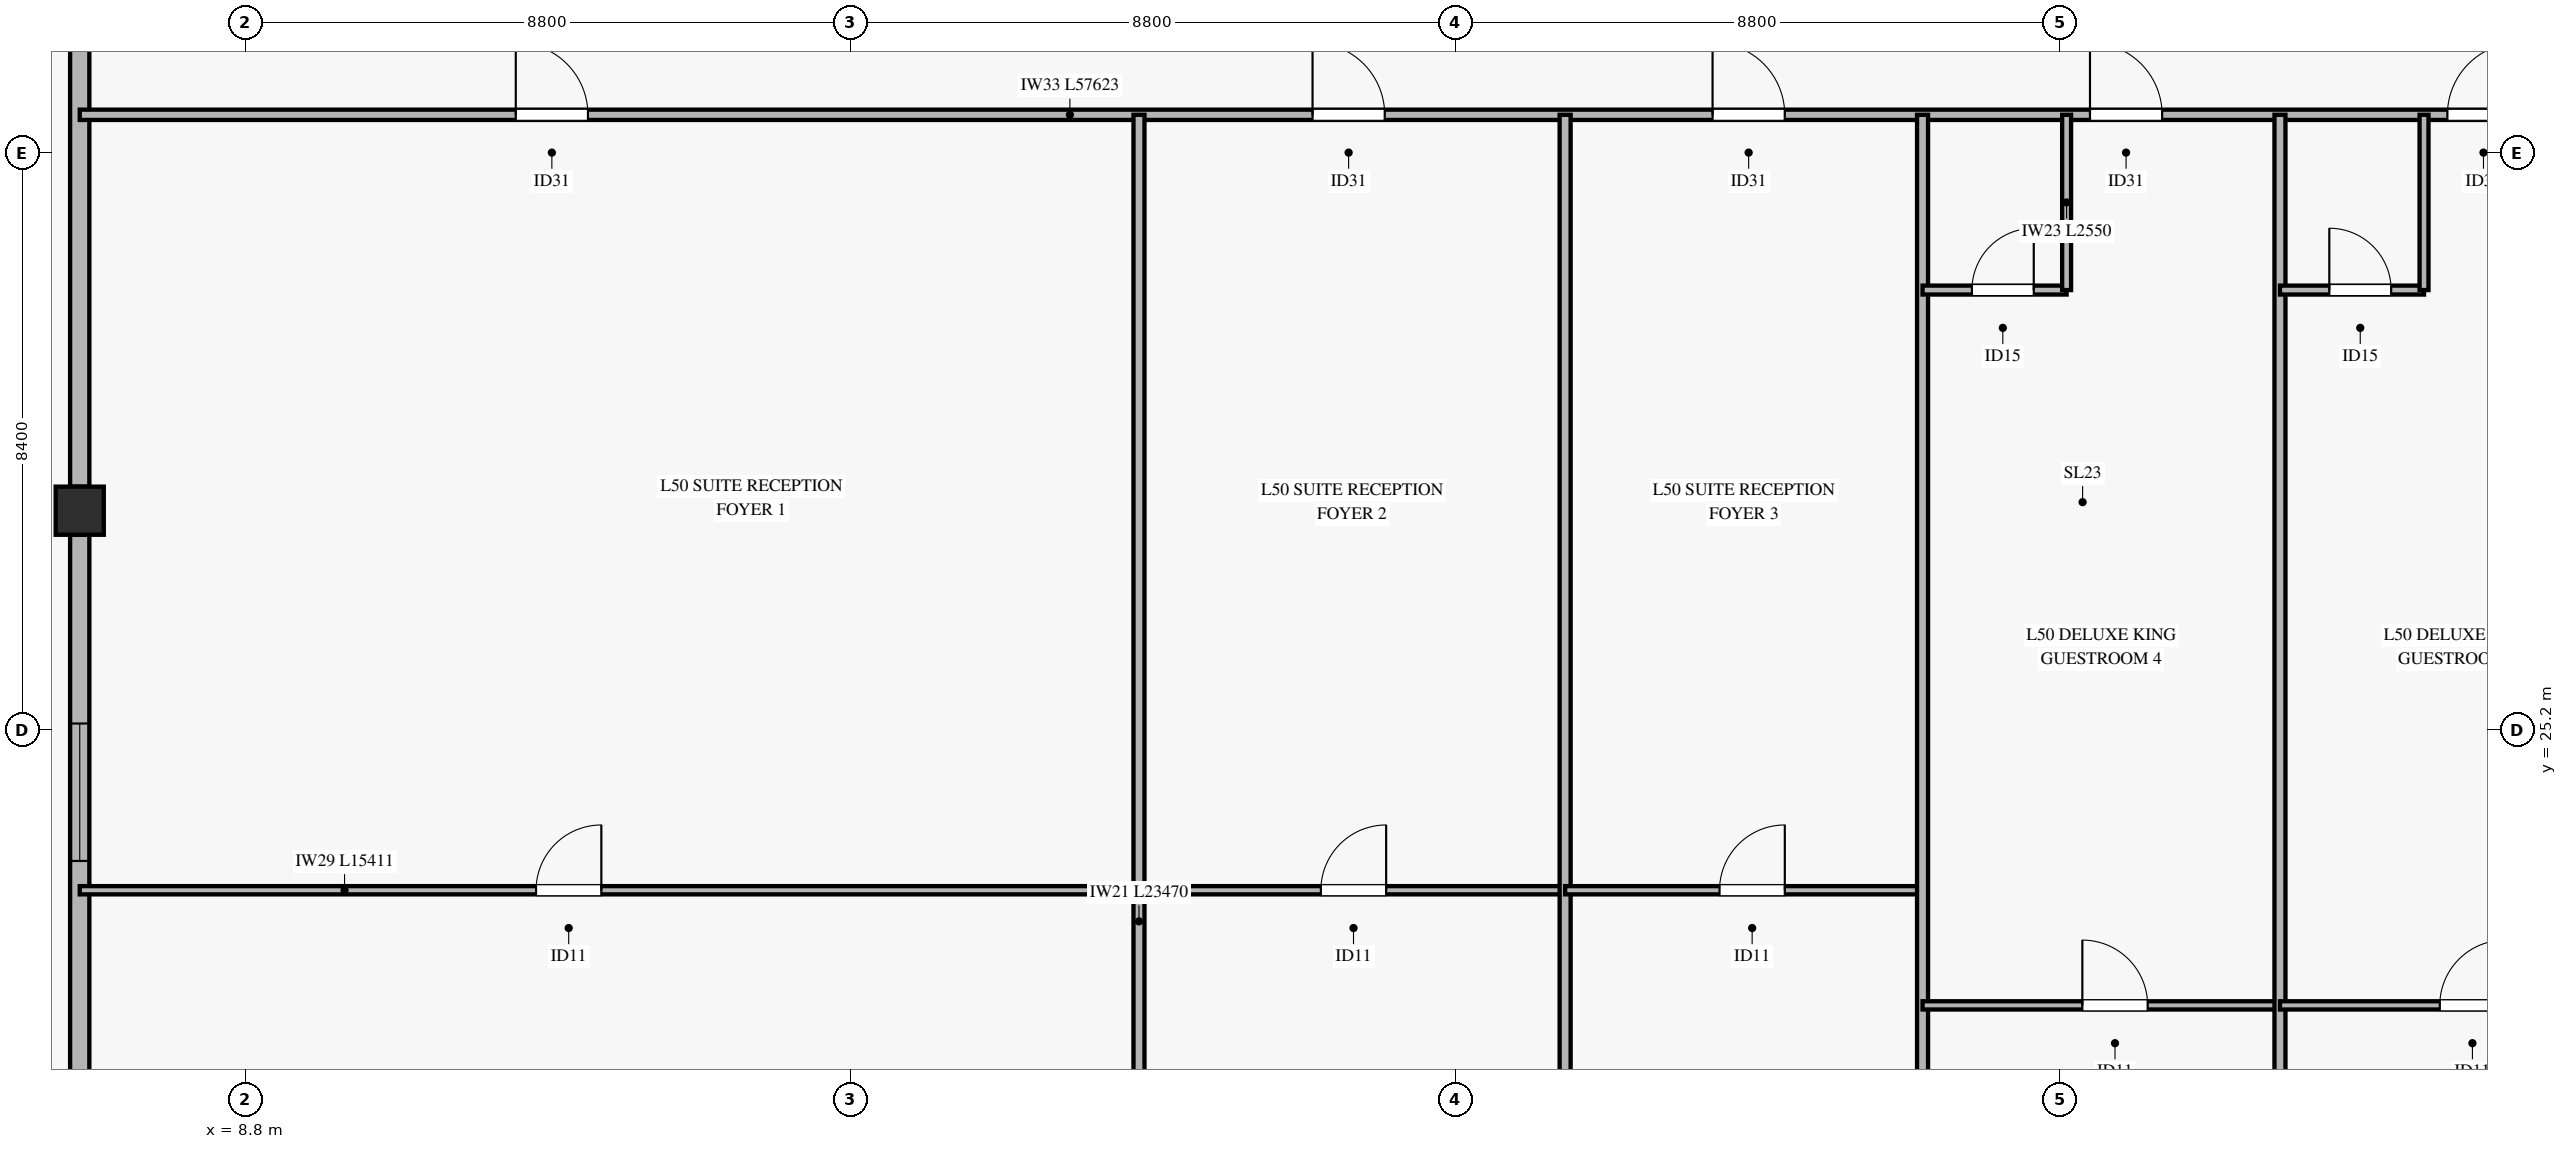
"""IFC4 building model, lengths in metres.
Left out: names, types, materials, properties, quantities, classifications, styles, units other than length and angle.
Written with IfcOpenShell. Run it as: python <this file> out.ifc"""

import sys

from ifc_helpers import new_model, si_unit, direction, frame, frame_2d, origin, origin_2d, place, context, subcontext, project, spatial, rectangle, hollow_rectangle, extrude, source, transform, mapped, element, fill, save


model = new_model("IFC4")
c1 = context("Model", 3, precision=1e-05, world=origin(), true_north=direction((0.0, 1.0)))
c2 = subcontext(c1, "Body", "Model", "MODEL_VIEW")
j1 = project(units=[si_unit("LENGTHUNIT", "METRE"), si_unit("PLANEANGLEUNIT", "RADIAN")], contexts=[c1])
p1 = place(None, origin())
s1 = spatial("IfcSite", under=j1, at=p1, CompositionType="ELEMENT")
p2 = place(p1, origin())
s2 = spatial("IfcBuilding", under=s1, at=p2, CompositionType="ELEMENT")
p3 = place(p2, frame((0.0, 0.0, 199.2)))
s3 = spatial("IfcBuildingStorey", under=s2, at=p3, CompositionType="ELEMENT", Elevation=199.2)
m1 = source(origin(), c2, "Body", "SweptSolid", [
    extrude(hollow_rectangle(XDim=0.7, YDim=0.7, WallThickness=0.032, at=origin_2d()), origin(), (0.0, 0.0, 1.0), 3.304),
])
p4 = place(p3, frame((6.389, 28.39, 0.0), z_axis=(0.095026488821, 0.106849380121, 0.989723787928), x_axis=(-0.747238227779, 0.664556266199, 0.0)))
e1 = element("IfcColumn", 1, at=p4, inside=s3, PredefinedType="COLUMN", context=c2, shape_type="MappedRepresentation", body=[
    mapped(m1, transform((0.0, 0.0, 0.0), x_axis=(1.0, 0.0, 0.0), y_axis=(0.0, 1.0, 0.0), z_axis=(0.0, 0.0, 1.0), scale=1.0)),
])
p5 = place(p3, frame((6.389, 13.515, 0.0), z_axis=(0.0, 0.0, 1.0), x_axis=(0.0, 1.0, 0.0)))
e2 = element("IfcWall", 2, at=p5, inside=s3, PredefinedType="SOLIDWALL", context=c2, shape_type="SweptSolid", body=[
    extrude(rectangle(XDim=14.525, YDim=0.28, at=frame_2d((7.263, 0.0))), origin(), (0.0, 0.0, 1.0), 2.75),
])
p6 = place(p5, frame((3.017, 0.0, 0.45)))
e3 = element("IfcOpeningElement", 3, at=p6, cuts=e2, PredefinedType="OPENING", context=c2, shape_type="SweptSolid", body=[
    extrude(rectangle(XDim=2.0, YDim=2.0, at=frame_2d((1.0, 1.0))), frame((0.0, 0.15, 0.0), z_axis=(0.0, -1.0, 0.0), x_axis=(1.0, 0.0, 0.0)), (0.0, 0.0, 1.0), 0.3),
])
p7 = place(p5, frame((9.779, 0.0, 0.45)))
e4 = element("IfcOpeningElement", 4, at=p7, cuts=e2, PredefinedType="OPENING", context=c2, shape_type="SweptSolid", body=[
    extrude(rectangle(XDim=2.0, YDim=2.0, at=frame_2d((1.0, 1.0))), frame((0.0, 0.15, 0.0), z_axis=(0.0, -1.0, 0.0), x_axis=(1.0, 0.0, 0.0)), (0.0, 0.0, 1.0), 0.3),
])
p8 = place(p3, frame((6.389, 28.74, 0.0), z_axis=(0.0, 0.0, 1.0), x_axis=(0.0, 1.0, 0.0)))
e5 = element("IfcWall", 5, at=p8, inside=s3, PredefinedType="SOLIDWALL", context=c2, shape_type="SweptSolid", body=[
    extrude(rectangle(XDim=14.525, YDim=0.28, at=frame_2d((7.262, 0.0))), origin(), (0.0, 0.0, 1.0), 2.75),
])
p9 = place(p8, frame((9.115, 0.0, 0.45)))
e6 = element("IfcOpeningElement", 6, at=p9, cuts=e5, PredefinedType="OPENING", context=c2, shape_type="SweptSolid", body=[
    extrude(rectangle(XDim=2.0, YDim=2.0, at=frame_2d((1.0, 1.0))), frame((0.0, 0.15, 0.0), z_axis=(0.0, -1.0, 0.0), x_axis=(1.0, 0.0, 0.0)), (0.0, 0.0, 1.0), 0.3),
])
p10 = place(p3, frame((6.389, 34.15, 0.0), z_axis=(0.0, 0.0, 1.0), x_axis=(1.0, 0.0, 0.0)))
e7 = element("IfcWall", 7, at=p10, inside=s3, PredefinedType="PARTITIONING", context=c2, shape_type="SweptSolid", body=[
    extrude(rectangle(XDim=57.623, YDim=0.15, at=frame_2d((28.812, 0.0))), origin(), (0.0, 0.0, 1.0), 2.455),
])
p11 = place(p10, frame((6.344, 0.0, 0.0)))
e8 = element("IfcOpeningElement", 8, at=p11, cuts=e7, PredefinedType="OPENING", context=c2, shape_type="SweptSolid", body=[
    extrude(rectangle(XDim=1.05, YDim=2.15, at=frame_2d((0.525, 1.075))), frame((0.0, 0.085, 0.0), z_axis=(0.0, -1.0, 0.0), x_axis=(1.0, 0.0, 0.0)), (0.0, 0.0, 1.0), 0.17),
])
p12 = place(p10, frame((17.936, 0.0, 0.0)))
e9 = element("IfcOpeningElement", 9, at=p12, cuts=e7, PredefinedType="OPENING", context=c2, shape_type="SweptSolid", body=[
    extrude(rectangle(XDim=1.05, YDim=2.15, at=frame_2d((0.525, 1.075))), frame((0.0, 0.085, 0.0), z_axis=(0.0, -1.0, 0.0), x_axis=(1.0, 0.0, 0.0)), (0.0, 0.0, 1.0), 0.17),
])
p13 = place(p10, frame((23.756, 0.0, 0.0)))
e10 = element("IfcOpeningElement", 10, at=p13, cuts=e7, PredefinedType="OPENING", context=c2, shape_type="SweptSolid", body=[
    extrude(rectangle(XDim=1.05, YDim=2.15, at=frame_2d((0.525, 1.075))), frame((0.0, 0.085, 0.0), z_axis=(0.0, -1.0, 0.0), x_axis=(1.0, 0.0, 0.0)), (0.0, 0.0, 1.0), 0.17),
])
p14 = place(p10, frame((29.247, 0.0, 0.0)))
e11 = element("IfcOpeningElement", 11, at=p14, cuts=e7, PredefinedType="OPENING", context=c2, shape_type="SweptSolid", body=[
    extrude(rectangle(XDim=1.05, YDim=2.15, at=frame_2d((0.525, 1.075))), frame((0.0, 0.085, 0.0), z_axis=(0.0, -1.0, 0.0), x_axis=(1.0, 0.0, 0.0)), (0.0, 0.0, 1.0), 0.17),
])
p15 = place(p10, frame((34.447, 0.0, 0.0)))
e12 = element("IfcOpeningElement", 12, at=p15, cuts=e7, PredefinedType="OPENING", context=c2, shape_type="SweptSolid", body=[
    extrude(rectangle(XDim=1.05, YDim=2.15, at=frame_2d((0.525, 1.075))), frame((0.0, 0.085, 0.0), z_axis=(0.0, -1.0, 0.0), x_axis=(1.0, 0.0, 0.0)), (0.0, 0.0, 1.0), 0.17),
])
p16 = place(p10, frame((44.941, 0.0, 0.0)))
e13 = element("IfcOpeningElement", 13, at=p16, cuts=e7, PredefinedType="OPENING", context=c2, shape_type="SweptSolid", body=[
    extrude(rectangle(XDim=1.05, YDim=2.15, at=frame_2d((0.525, 1.075))), frame((0.0, 0.085, 0.0), z_axis=(0.0, -1.0, 0.0), x_axis=(1.0, 0.0, 0.0)), (0.0, 0.0, 1.0), 0.17),
])
p17 = place(p3, frame((6.389, 22.868, 0.0), z_axis=(0.0, 0.0, 1.0), x_axis=(1.0, 0.0, 0.0)))
e14 = element("IfcWall", 14, at=p17, inside=s3, PredefinedType="PARTITIONING", context=c2, shape_type="SweptSolid", body=[
    extrude(rectangle(XDim=15.411, YDim=0.12, at=frame_2d((7.706, 0.0))), origin(), (0.0, 0.0, 1.0), 2.455),
])
p18 = place(p17, frame((6.639, 0.0, 0.0)))
e15 = element("IfcOpeningElement", 15, at=p18, cuts=e14, PredefinedType="OPENING", context=c2, shape_type="SweptSolid", body=[
    extrude(rectangle(XDim=0.95, YDim=2.1, at=frame_2d((0.475, 1.05))), frame((0.0, 0.07, 0.0), z_axis=(0.0, -1.0, 0.0), x_axis=(1.0, 0.0, 0.0)), (0.0, 0.0, 1.0), 0.14),
])
p19 = place(p3, frame((21.8, 10.68, 0.0), z_axis=(0.0, 0.0, 1.0), x_axis=(0.0, 1.0, 0.0)))
e16 = element("IfcWall", 16, at=p19, inside=s3, PredefinedType="PARTITIONING", context=c2, shape_type="SweptSolid", body=[
    extrude(rectangle(XDim=23.47, YDim=0.16, at=frame_2d((11.735, 0.0))), origin(), (0.0, 0.0, 1.0), 2.755),
])
p20 = place(p3, frame((21.8, 22.868, 0.0), z_axis=(0.0, 0.0, 1.0), x_axis=(1.0, 0.0, 0.0)))
e17 = element("IfcWall", 17, at=p20, inside=s3, PredefinedType="PARTITIONING", context=c2, shape_type="SweptSolid", body=[
    extrude(rectangle(XDim=6.2, YDim=0.12, at=frame_2d((3.1, 0.0))), origin(), (0.0, 0.0, 1.0), 3.27),
])
p21 = place(p20, frame((2.646, 0.0, 0.0)))
e18 = element("IfcOpeningElement", 18, at=p21, cuts=e17, PredefinedType="OPENING", context=c2, shape_type="SweptSolid", body=[
    extrude(rectangle(XDim=0.95, YDim=2.1, at=frame_2d((0.475, 1.05))), frame((0.0, 0.07, 0.0), z_axis=(0.0, -1.0, 0.0), x_axis=(1.0, 0.0, 0.0)), (0.0, 0.0, 1.0), 0.14),
])
p22 = place(p3, frame((28.0, 10.68, 0.0), z_axis=(0.0, 0.0, 1.0), x_axis=(0.0, 1.0, 0.0)))
e19 = element("IfcWall", 19, at=p22, inside=s3, PredefinedType="PARTITIONING", context=c2, shape_type="SweptSolid", body=[
    extrude(rectangle(XDim=23.47, YDim=0.16, at=frame_2d((11.735, 0.0))), origin(), (0.0, 0.0, 1.0), 2.755),
])
p23 = place(p3, frame((28.0, 22.868, 0.0), z_axis=(0.0, 0.0, 1.0), x_axis=(1.0, 0.0, 0.0)))
e20 = element("IfcWall", 20, at=p23, inside=s3, PredefinedType="PARTITIONING", context=c2, shape_type="SweptSolid", body=[
    extrude(rectangle(XDim=5.2, YDim=0.12, at=frame_2d((2.6, 0.0))), origin(), (0.0, 0.0, 1.0), 2.455),
])
p24 = place(p23, frame((2.246, 0.0, 0.0)))
e21 = element("IfcOpeningElement", 21, at=p24, cuts=e20, PredefinedType="OPENING", context=c2, shape_type="SweptSolid", body=[
    extrude(rectangle(XDim=0.95, YDim=2.1, at=frame_2d((0.475, 1.05))), frame((0.0, 0.07, 0.0), z_axis=(0.0, -1.0, 0.0), x_axis=(1.0, 0.0, 0.0)), (0.0, 0.0, 1.0), 0.14),
])
p25 = place(p3, frame((33.2, 10.68, 0.0), z_axis=(0.0, 0.0, 1.0), x_axis=(0.0, 1.0, 0.0)))
e22 = element("IfcWall", 22, at=p25, inside=s3, PredefinedType="PARTITIONING", context=c2, shape_type="SweptSolid", body=[
    extrude(rectangle(XDim=23.47, YDim=0.16, at=frame_2d((11.735, 0.0))), origin(), (0.0, 0.0, 1.0), 2.755),
])
p26 = place(p3, frame((33.2, 31.6, 0.0), z_axis=(0.0, 0.0, 1.0), x_axis=(1.0, 0.0, 0.0)))
e23 = element("IfcWall", 23, at=p26, inside=s3, PredefinedType="PARTITIONING", context=c2, shape_type="SweptSolid", body=[
    extrude(rectangle(XDim=2.096, YDim=0.13, at=frame_2d((1.048, 0.0))), origin(), (0.0, 0.0, 1.0), 3.27),
])
p27 = place(p26, frame((0.718, 0.0, 0.0)))
e24 = element("IfcOpeningElement", 24, at=p27, cuts=e23, PredefinedType="OPENING", context=c2, shape_type="SweptSolid", body=[
    extrude(rectangle(XDim=0.9, YDim=2.1, at=frame_2d((0.45, 1.05))), frame((0.0, 0.075, 0.0), z_axis=(0.0, -1.0, 0.0), x_axis=(1.0, 0.0, 0.0)), (0.0, 0.0, 1.0), 0.15),
])
p28 = place(p3, frame((35.296, 31.6, 0.0), z_axis=(0.0, 0.0, 1.0), x_axis=(0.0, 1.0, 0.0)))
e25 = element("IfcWall", 25, at=p28, inside=s3, PredefinedType="PARTITIONING", context=c2, shape_type="SweptSolid", body=[
    extrude(rectangle(XDim=2.55, YDim=0.13, at=frame_2d((1.275, 0.0))), origin(), (0.0, 0.0, 1.0), 2.805),
])
p29 = place(p3, frame((33.2, 21.193, 0.0), z_axis=(0.0, 0.0, 1.0), x_axis=(1.0, 0.0, 0.0)))
e26 = element("IfcWall", 26, at=p29, inside=s3, PredefinedType="PARTITIONING", context=c2, shape_type="SweptSolid", body=[
    extrude(rectangle(XDim=5.2, YDim=0.12, at=frame_2d((2.6, 0.0))), origin(), (0.0, 0.0, 1.0), 2.455),
])
p30 = place(p29, frame((2.325, 0.0, 0.0)))
e27 = element("IfcOpeningElement", 27, at=p30, cuts=e26, PredefinedType="OPENING", context=c2, shape_type="SweptSolid", body=[
    extrude(rectangle(XDim=0.95, YDim=2.1, at=frame_2d((0.475, 1.05))), frame((0.0, 0.07, 0.0), z_axis=(0.0, -1.0, 0.0), x_axis=(1.0, 0.0, 0.0)), (0.0, 0.0, 1.0), 0.14),
])
p31 = place(p3, frame((38.4, 10.68, 0.0), z_axis=(0.0, 0.0, 1.0), x_axis=(0.0, 1.0, 0.0)))
e28 = element("IfcWall", 28, at=p31, inside=s3, PredefinedType="PARTITIONING", context=c2, shape_type="SweptSolid", body=[
    extrude(rectangle(XDim=23.47, YDim=0.16, at=frame_2d((11.735, 0.0))), origin(), (0.0, 0.0, 1.0), 2.755),
])
p32 = place(p3, frame((38.4, 31.6, 0.0), z_axis=(0.0, 0.0, 1.0), x_axis=(1.0, 0.0, 0.0)))
e29 = element("IfcWall", 29, at=p32, inside=s3, PredefinedType="PARTITIONING", context=c2, shape_type="SweptSolid", body=[
    extrude(rectangle(XDim=2.096, YDim=0.13, at=frame_2d((1.048, 0.0))), origin(), (0.0, 0.0, 1.0), 3.27),
])
p33 = place(p32, frame((0.718, 0.0, 0.0)))
e30 = element("IfcOpeningElement", 30, at=p33, cuts=e29, PredefinedType="OPENING", context=c2, shape_type="SweptSolid", body=[
    extrude(rectangle(XDim=0.9, YDim=2.1, at=frame_2d((0.45, 1.05))), frame((0.0, 0.075, 0.0), z_axis=(0.0, -1.0, 0.0), x_axis=(1.0, 0.0, 0.0)), (0.0, 0.0, 1.0), 0.15),
])
p34 = place(p3, frame((40.496, 31.6, 0.0), z_axis=(0.0, 0.0, 1.0), x_axis=(0.0, 1.0, 0.0)))
e31 = element("IfcWall", 31, at=p34, inside=s3, PredefinedType="PARTITIONING", context=c2, shape_type="SweptSolid", body=[
    extrude(rectangle(XDim=2.55, YDim=0.13, at=frame_2d((1.275, 0.0))), origin(), (0.0, 0.0, 1.0), 2.805),
])
p35 = place(p3, frame((38.4, 21.193, 0.0), z_axis=(0.0, 0.0, 1.0), x_axis=(1.0, 0.0, 0.0)))
e32 = element("IfcWall", 32, at=p35, inside=s3, PredefinedType="PARTITIONING", context=c2, shape_type="SweptSolid", body=[
    extrude(rectangle(XDim=5.2, YDim=0.12, at=frame_2d((2.6, 0.0))), origin(), (0.0, 0.0, 1.0), 3.27),
])
p36 = place(p35, frame((2.325, 0.0, 0.0)))
e33 = element("IfcOpeningElement", 33, at=p36, cuts=e32, PredefinedType="OPENING", context=c2, shape_type="SweptSolid", body=[
    extrude(rectangle(XDim=0.95, YDim=2.1, at=frame_2d((0.475, 1.05))), frame((0.0, 0.07, 0.0), z_axis=(0.0, -1.0, 0.0), x_axis=(1.0, 0.0, 0.0)), (0.0, 0.0, 1.0), 0.14),
])
m2 = source(origin(), c2, "Body", "SweptSolid", [
    extrude(rectangle(XDim=2.0, YDim=2.0, at=frame_2d((1.0, 1.0))), frame((0.0, 0.03, 0.0), z_axis=(0.0, -1.0, 0.0), x_axis=(1.0, 0.0, 0.0)), (0.0, 0.0, 1.0), 0.06),
])
p37 = place(p7, origin())
e34 = element("IfcWindow", 34, at=p37, inside=s3, PartitioningType="SINGLE_PANEL", PredefinedType="WINDOW", context=c2, shape_type="MappedRepresentation", body=[
    mapped(m2, transform((0.0, 0.0, 0.0), x_axis=(1.0, 0.0, 0.0), y_axis=(0.0, 1.0, 0.0), z_axis=(0.0, 0.0, 1.0), scale=1.0)),
])
fill(e4, e34)
m3 = source(origin(), c2, "Body", "SweptSolid", [
    extrude(rectangle(XDim=1.05, YDim=2.15, at=frame_2d((0.525, 1.075))), frame((0.0, 0.025, 0.0), z_axis=(0.0, -1.0, 0.0), x_axis=(1.0, 0.0, 0.0)), (0.0, 0.0, 1.0), 0.05),
])
p38 = place(p11, origin())
e35 = element("IfcDoor", 35, at=p38, inside=s3, OperationType="SINGLE_SWING_LEFT", PredefinedType="DOOR", context=c2, shape_type="MappedRepresentation", body=[
    mapped(m3, transform((0.0, 0.0, 0.0), x_axis=(1.0, 0.0, 0.0), y_axis=(0.0, 1.0, 0.0), z_axis=(0.0, 0.0, 1.0), scale=1.0)),
])
fill(e8, e35)
m4 = source(origin(), c2, "Body", "SweptSolid", [
    extrude(rectangle(XDim=0.95, YDim=2.1, at=frame_2d((0.475, 1.05))), frame((0.0, 0.025, 0.0), z_axis=(0.0, -1.0, 0.0), x_axis=(1.0, 0.0, 0.0)), (0.0, 0.0, 1.0), 0.05),
])
p39 = place(p18, origin())
e36 = element("IfcDoor", 36, at=p39, inside=s3, OperationType="SINGLE_SWING_RIGHT", PredefinedType="DOOR", context=c2, shape_type="MappedRepresentation", body=[
    mapped(m4, transform((0.0, 0.0, 0.0), x_axis=(1.0, 0.0, 0.0), y_axis=(0.0, 1.0, 0.0), z_axis=(0.0, 0.0, 1.0), scale=1.0)),
])
fill(e15, e36)
p40 = place(p12, origin())
e37 = element("IfcDoor", 37, at=p40, inside=s3, OperationType="SINGLE_SWING_LEFT", PredefinedType="DOOR", context=c2, shape_type="MappedRepresentation", body=[
    mapped(m3, transform((0.0, 0.0, 0.0), x_axis=(1.0, 0.0, 0.0), y_axis=(0.0, 1.0, 0.0), z_axis=(0.0, 0.0, 1.0), scale=1.0)),
])
fill(e9, e37)
p41 = place(p21, origin())
e38 = element("IfcDoor", 38, at=p41, inside=s3, OperationType="SINGLE_SWING_RIGHT", PredefinedType="DOOR", context=c2, shape_type="MappedRepresentation", body=[
    mapped(m4, transform((0.0, 0.0, 0.0), x_axis=(1.0, 0.0, 0.0), y_axis=(0.0, 1.0, 0.0), z_axis=(0.0, 0.0, 1.0), scale=1.0)),
])
fill(e18, e38)
p42 = place(p13, origin())
e39 = element("IfcDoor", 39, at=p42, inside=s3, OperationType="SINGLE_SWING_LEFT", PredefinedType="DOOR", context=c2, shape_type="MappedRepresentation", body=[
    mapped(m3, transform((0.0, 0.0, 0.0), x_axis=(1.0, 0.0, 0.0), y_axis=(0.0, 1.0, 0.0), z_axis=(0.0, 0.0, 1.0), scale=1.0)),
])
fill(e10, e39)
p43 = place(p24, origin())
e40 = element("IfcDoor", 40, at=p43, inside=s3, OperationType="SINGLE_SWING_RIGHT", PredefinedType="DOOR", context=c2, shape_type="MappedRepresentation", body=[
    mapped(m4, transform((0.0, 0.0, 0.0), x_axis=(1.0, 0.0, 0.0), y_axis=(0.0, 1.0, 0.0), z_axis=(0.0, 0.0, 1.0), scale=1.0)),
])
fill(e21, e40)
p44 = place(p14, origin())
e41 = element("IfcDoor", 41, at=p44, inside=s3, OperationType="SINGLE_SWING_LEFT", PredefinedType="DOOR", context=c2, shape_type="MappedRepresentation", body=[
    mapped(m3, transform((0.0, 0.0, 0.0), x_axis=(1.0, 0.0, 0.0), y_axis=(0.0, 1.0, 0.0), z_axis=(0.0, 0.0, 1.0), scale=1.0)),
])
fill(e11, e41)
m5 = source(origin(), c2, "Body", "SweptSolid", [
    extrude(rectangle(XDim=0.9, YDim=2.1, at=frame_2d((0.45, 1.05))), frame((0.0, 0.025, 0.0), z_axis=(0.0, -1.0, 0.0), x_axis=(1.0, 0.0, 0.0)), (0.0, 0.0, 1.0), 0.05),
])
p45 = place(p27, origin())
e42 = element("IfcDoor", 42, at=p45, inside=s3, OperationType="SINGLE_SWING_RIGHT", PredefinedType="DOOR", context=c2, shape_type="MappedRepresentation", body=[
    mapped(m5, transform((0.0, 0.0, 0.0), x_axis=(1.0, 0.0, 0.0), y_axis=(0.0, 1.0, 0.0), z_axis=(0.0, 0.0, 1.0), scale=1.0)),
])
fill(e24, e42)
p46 = place(p30, origin())
e43 = element("IfcDoor", 43, at=p46, inside=s3, OperationType="SINGLE_SWING_LEFT", PredefinedType="DOOR", context=c2, shape_type="MappedRepresentation", body=[
    mapped(m4, transform((0.0, 0.0, 0.0), x_axis=(1.0, 0.0, 0.0), y_axis=(0.0, 1.0, 0.0), z_axis=(0.0, 0.0, 1.0), scale=1.0)),
])
fill(e27, e43)
p47 = place(p15, origin())
e44 = element("IfcDoor", 44, at=p47, inside=s3, OperationType="SINGLE_SWING_RIGHT", PredefinedType="DOOR", context=c2, shape_type="MappedRepresentation", body=[
    mapped(m3, transform((0.0, 0.0, 0.0), x_axis=(1.0, 0.0, 0.0), y_axis=(0.0, 1.0, 0.0), z_axis=(0.0, 0.0, 1.0), scale=1.0)),
])
fill(e12, e44)
p48 = place(p33, origin())
e45 = element("IfcDoor", 45, at=p48, inside=s3, OperationType="SINGLE_SWING_LEFT", PredefinedType="DOOR", context=c2, shape_type="MappedRepresentation", body=[
    mapped(m5, transform((0.0, 0.0, 0.0), x_axis=(1.0, 0.0, 0.0), y_axis=(0.0, 1.0, 0.0), z_axis=(0.0, 0.0, 1.0), scale=1.0)),
])
fill(e30, e45)
p49 = place(p36, origin())
e46 = element("IfcDoor", 46, at=p49, inside=s3, OperationType="SINGLE_SWING_RIGHT", PredefinedType="DOOR", context=c2, shape_type="MappedRepresentation", body=[
    mapped(m4, transform((0.0, 0.0, 0.0), x_axis=(1.0, 0.0, 0.0), y_axis=(0.0, 1.0, 0.0), z_axis=(0.0, 0.0, 1.0), scale=1.0)),
])
fill(e33, e46)
save(model, sys.argv[1])
